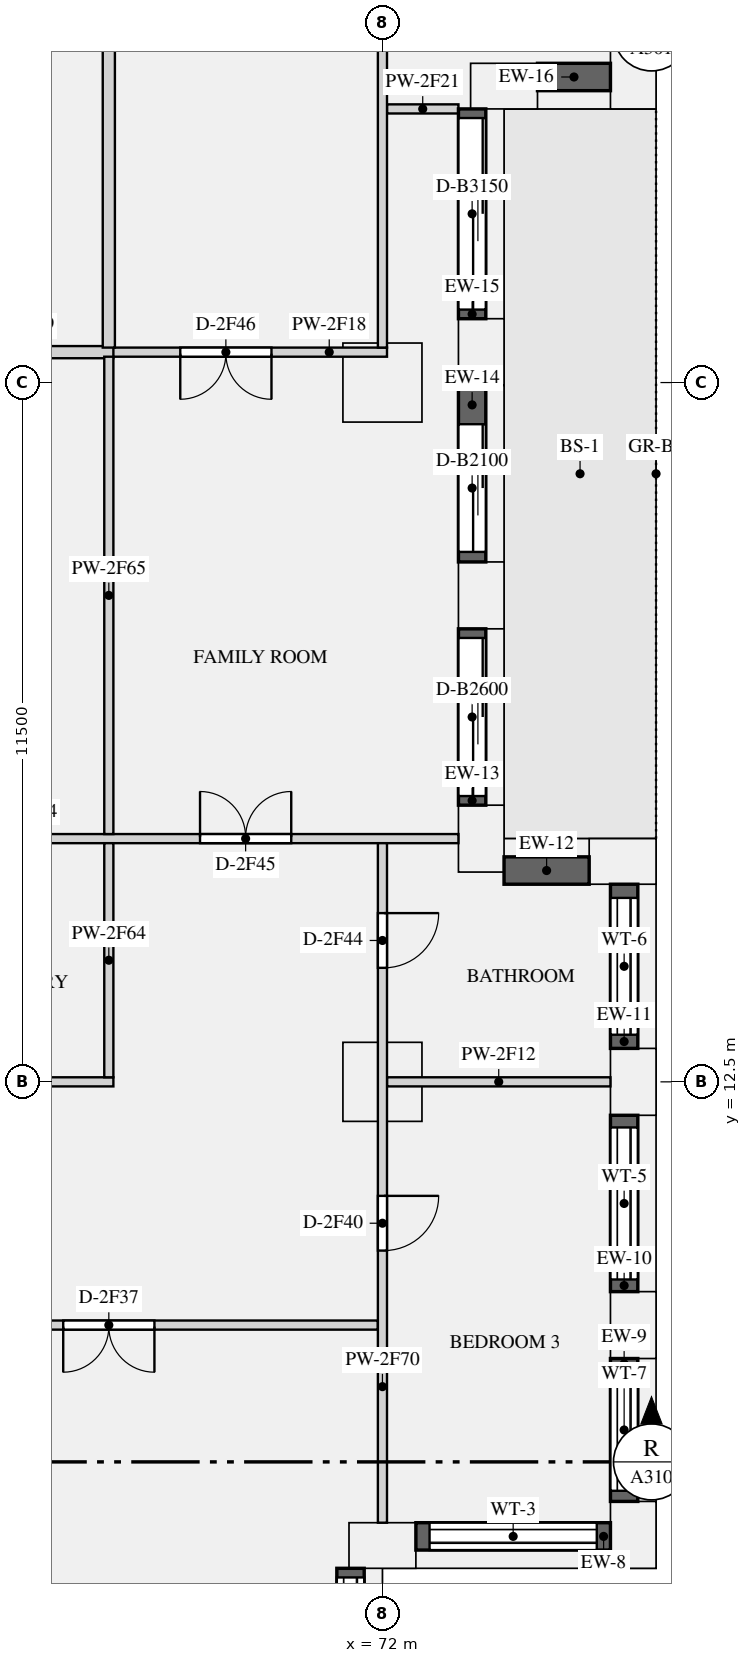
"""IFC4 building model, lengths in metres.
Left out: names, types, materials, properties, quantities, classifications, styles, units other than length and angle.
Written with IfcOpenShell. Run it as: python <this file> out.ifc"""

import sys

from ifc_helpers import new_model, si_unit, direction, frame, frame_2d, origin, origin_2d, place, context, subcontext, project, spatial, rectangle, extrude, element, fill, save


model = new_model("IFC4")
c1 = context("Model", 3, precision=1e-05, world=origin(), true_north=direction((0.0, 1.0)))
c2 = subcontext(c1, "Body", "Model", "MODEL_VIEW")
j1 = project(units=[si_unit("LENGTHUNIT", "METRE"), si_unit("PLANEANGLEUNIT", "RADIAN")], contexts=[c1])
p1 = place(None, origin())
s1 = spatial("IfcSite", under=j1, at=p1, CompositionType="ELEMENT")
p2 = place(p1, origin())
s2 = spatial("IfcBuilding", under=s1, at=p2, CompositionType="ELEMENT")
p3 = place(p2, frame((0.0, 0.0, 124.5)))
s3 = spatial("IfcBuildingStorey", under=s2, at=p3, CompositionType="ELEMENT", Elevation=124.5)
for number, where, z_axis, x_axis in (
    (1, (72.0, 4.875, 0.0), (0.0, 0.0, 1.0), (1.0, 0.0, 0.0)),
    (2, (76.125, 5.05, 0.0), (0.0, 0.0, 1.0), (0.0, 1.0, 0.0)),
    (3, (76.125, 8.5, 0.0), (0.0, 0.0, 1.0), (0.0, 1.0, 0.0)),
    (4, (76.125, 12.5, 0.0), (0.0, 0.0, 1.0), (0.0, 1.0, 0.0)),
    (5, (75.95, 16.125, 0.0), (0.0, 0.0, 1.0), (-1.0, 0.0, 0.0)),
    (6, (73.625, 16.5, 0.0), (0.0, 0.0, 1.0), (0.0, 1.0, 0.0)),
    (7, (73.625, 20.5, 0.0), (0.0, 0.0, 1.0), (0.0, 1.0, 0.0)),
    (8, (73.625, 24.5, 0.0), (0.0, 0.0, 1.0), (0.0, 1.0, 0.0)),
    (9, (74.0, 28.875, 0.0), (0.0, 0.0, 1.0), (1.0, 0.0, 0.0)),
    (10, (76.125, 29.05, 0.0), (0.0, 0.0, 1.0), (0.0, 1.0, 0.0)),
):
    element("IfcColumn", number, at=place(p3, frame(where, z_axis=z_axis, x_axis=x_axis)), inside=s3, PredefinedType="USERDEFINED", context=c2, shape_type="SweptSolid", body=[
        extrude(rectangle(XDim=1.1, YDim=0.75, at=origin_2d()), origin(), (0.0, 0.0, 1.0), 3.15),
    ])
for number, where, z_axis, x_axis in (
    (11, (72.0, 24.0, 0.0), (0.0, 0.0, 1.0), (1.0, 0.0, 0.0)),
    (12, (72.0, 12.5, 0.0), (0.0, 0.0, 1.0), (1.0, 0.0, 0.0)),
):
    element("IfcColumn", number, at=place(p3, frame(where, z_axis=z_axis, x_axis=x_axis)), inside=s3, PredefinedType="COLUMN", context=c2, shape_type="SweptSolid", body=[
        extrude(rectangle(XDim=1.3, YDim=1.3, at=origin_2d()), origin(), (0.0, 0.0, 1.0), 3.15),
    ])
p4 = place(p3, frame((71.475, 1.1, 0.9), z_axis=(0.0, 0.0, 1.0), x_axis=(0.0, 1.0, 0.0)))
e13 = element("IfcWall", 13, at=p4, inside=s3, PredefinedType="SOLIDWALL", context=c2, shape_type="SweptSolid", body=[
    extrude(rectangle(XDim=3.4, YDim=0.45, at=frame_2d((1.7, 0.0))), origin(), (0.0, 0.0, 1.0), 1.93),
])
p5 = place(p4, frame((0.15, 0.0, 0.15)))
e14 = element("IfcOpeningElement", 14, at=p5, cuts=e13, PredefinedType="OPENING", context=c2, shape_type="SweptSolid", body=[
    extrude(rectangle(XDim=3.1, YDim=1.5, at=frame_2d((1.55, 0.75))), frame((0.0, 0.235, 0.0), z_axis=(0.0, -1.0, 0.0), x_axis=(1.0, 0.0, 0.0)), (0.0, 0.0, 1.0), 0.47),
])
p6 = place(p3, frame((72.55, 5.025, 0.9), z_axis=(0.0, 0.0, 1.0), x_axis=(1.0, 0.0, 0.0)))
e15 = element("IfcWall", 15, at=p6, inside=s3, PredefinedType="SOLIDWALL", context=c2, shape_type="SweptSolid", body=[
    extrude(rectangle(XDim=3.2, YDim=0.45, at=frame_2d((1.6, 0.0))), origin(), (0.0, 0.0, 1.0), 1.93),
])
p7 = place(p6, frame((0.225, 0.0, 0.15)))
e16 = element("IfcOpeningElement", 16, at=p7, cuts=e15, PredefinedType="OPENING", context=c2, shape_type="SweptSolid", body=[
    extrude(rectangle(XDim=2.75, YDim=1.5, at=frame_2d((1.375, 0.75))), frame((0.0, 0.235, 0.0), z_axis=(0.0, -1.0, 0.0), x_axis=(1.0, 0.0, 0.0)), (0.0, 0.0, 1.0), 0.47),
])
p8 = place(p3, frame((75.975, 5.6, 0.9), z_axis=(0.0, 0.0, 1.0), x_axis=(0.0, 1.0, 0.0)))
e17 = element("IfcWall", 17, at=p8, inside=s3, PredefinedType="SOLIDWALL", context=c2, shape_type="SweptSolid", body=[
    extrude(rectangle(XDim=2.35, YDim=0.45, at=frame_2d((1.175, 0.0))), origin(), (0.0, 0.0, 1.0), 1.93),
])
p9 = place(p8, frame((0.175, 0.0, 0.15)))
e18 = element("IfcOpeningElement", 18, at=p9, cuts=e17, PredefinedType="OPENING", context=c2, shape_type="SweptSolid", body=[
    extrude(rectangle(XDim=2.0, YDim=1.5, at=frame_2d((1.0, 0.75))), frame((0.0, 0.235, 0.0), z_axis=(0.0, -1.0, 0.0), x_axis=(1.0, 0.0, 0.0)), (0.0, 0.0, 1.0), 0.47),
])
p10 = place(p3, frame((75.975, 9.05, 0.9), z_axis=(0.0, 0.0, 1.0), x_axis=(0.0, 1.0, 0.0)))
e19 = element("IfcWall", 19, at=p10, inside=s3, PredefinedType="SOLIDWALL", context=c2, shape_type="SweptSolid", body=[
    extrude(rectangle(XDim=2.9, YDim=0.45, at=frame_2d((1.45, 0.0))), origin(), (0.0, 0.0, 1.0), 1.93),
])
p11 = place(p10, frame((0.2, 0.0, 0.15)))
e20 = element("IfcOpeningElement", 20, at=p11, cuts=e19, PredefinedType="OPENING", context=c2, shape_type="SweptSolid", body=[
    extrude(rectangle(XDim=2.5, YDim=1.5, at=frame_2d((1.25, 0.75))), frame((0.0, 0.235, 0.0), z_axis=(0.0, -1.0, 0.0), x_axis=(1.0, 0.0, 0.0)), (0.0, 0.0, 1.0), 0.47),
])
p12 = place(p3, frame((75.975, 13.05, 0.9), z_axis=(0.0, 0.0, 1.0), x_axis=(0.0, 1.0, 0.0)))
e21 = element("IfcWall", 21, at=p12, inside=s3, PredefinedType="SOLIDWALL", context=c2, shape_type="SweptSolid", body=[
    extrude(rectangle(XDim=2.7, YDim=0.45, at=frame_2d((1.35, 0.0))), origin(), (0.0, 0.0, 1.0), 1.93),
])
p13 = place(p12, frame((0.225, 0.0, 0.15)))
e22 = element("IfcOpeningElement", 22, at=p13, cuts=e21, PredefinedType="OPENING", context=c2, shape_type="SweptSolid", body=[
    extrude(rectangle(XDim=2.25, YDim=1.5, at=frame_2d((1.125, 0.75))), frame((0.0, 0.235, 0.0), z_axis=(0.0, -1.0, 0.0), x_axis=(1.0, 0.0, 0.0)), (0.0, 0.0, 1.0), 0.47),
])
p14 = place(p3, frame((75.4, 15.975, 0.9), z_axis=(0.0, 0.0, 1.0), x_axis=(-1.0, 0.0, 0.0)))
e23 = element("IfcWall", 23, at=p14, inside=s3, PredefinedType="SOLIDWALL", context=c2, shape_type="SweptSolid", body=[
    extrude(rectangle(XDim=1.4, YDim=0.45, at=frame_2d((0.7, 0.0))), origin(), (0.0, 0.0, 1.0), 1.93),
])
p15 = place(p3, frame((73.475, 17.05, 0.0), z_axis=(0.0, 0.0, 1.0), x_axis=(0.0, 1.0, 0.0)))
e24 = element("IfcWall", 24, at=p15, inside=s3, PredefinedType="SOLIDWALL", context=c2, shape_type="SweptSolid", body=[
    extrude(rectangle(XDim=2.9, YDim=0.45, at=frame_2d((1.45, 0.0))), origin(), (0.0, 0.0, 1.0), 2.83),
])
p16 = place(p15, frame((0.15, 0.0, 0.0)))
e25 = element("IfcOpeningElement", 25, at=p16, cuts=e24, PredefinedType="OPENING", context=c2, shape_type="SweptSolid", body=[
    extrude(rectangle(XDim=2.6, YDim=2.3, at=frame_2d((1.3, 1.15))), frame((0.0, 0.235, 0.0), z_axis=(0.0, -1.0, 0.0), x_axis=(1.0, 0.0, 0.0)), (0.0, 0.0, 1.0), 0.47),
])
p17 = place(p3, frame((73.475, 21.05, 0.0), z_axis=(0.0, 0.0, 1.0), x_axis=(0.0, 1.0, 0.0)))
e26 = element("IfcWall", 26, at=p17, inside=s3, PredefinedType="SOLIDWALL", context=c2, shape_type="SweptSolid", body=[
    extrude(rectangle(XDim=2.9, YDim=0.45, at=frame_2d((1.45, 0.0))), origin(), (0.0, 0.0, 1.0), 2.83),
])
p18 = place(p17, frame((0.165, 0.0, 0.0)))
e27 = element("IfcOpeningElement", 27, at=p18, cuts=e26, PredefinedType="OPENING", context=c2, shape_type="SweptSolid", body=[
    extrude(rectangle(XDim=2.1, YDim=2.3, at=frame_2d((1.05, 1.15))), frame((0.0, 0.235, 0.0), z_axis=(0.0, -1.0, 0.0), x_axis=(1.0, 0.0, 0.0)), (0.0, 0.0, 1.0), 0.47),
])
p19 = place(p3, frame((73.475, 25.05, 0.0), z_axis=(0.0, 0.0, 1.0), x_axis=(0.0, 1.0, 0.0)))
e28 = element("IfcWall", 28, at=p19, inside=s3, PredefinedType="SOLIDWALL", context=c2, shape_type="SweptSolid", body=[
    extrude(rectangle(XDim=3.45, YDim=0.45, at=frame_2d((1.725, 0.0))), origin(), (0.0, 0.0, 1.0), 2.83),
])
p20 = place(p19, frame((0.15, 0.0, 0.0)))
e29 = element("IfcOpeningElement", 29, at=p20, cuts=e28, PredefinedType="OPENING", context=c2, shape_type="SweptSolid", body=[
    extrude(rectangle(XDim=3.15, YDim=2.3, at=frame_2d((1.575, 1.15))), frame((0.0, 0.235, 0.0), z_axis=(0.0, -1.0, 0.0), x_axis=(1.0, 0.0, 0.0)), (0.0, 0.0, 1.0), 0.47),
])
p21 = place(p3, frame((74.55, 29.025, 0.9), z_axis=(0.0, 0.0, 1.0), x_axis=(1.0, 0.0, 0.0)))
e30 = element("IfcWall", 30, at=p21, inside=s3, PredefinedType="SOLIDWALL", context=c2, shape_type="SweptSolid", body=[
    extrude(rectangle(XDim=1.2, YDim=0.45, at=frame_2d((0.6, 0.0))), origin(), (0.0, 0.0, 1.0), 1.93),
])
p22 = place(p3, frame((58.425, 12.5, 0.0), z_axis=(0.0, 0.0, 1.0), x_axis=(1.0, 0.0, 0.0)))
e31 = element("IfcWall", 31, at=p22, inside=s3, PredefinedType="PARTITIONING", context=c2, shape_type="SweptSolid", body=[
    extrude(rectangle(XDim=9.15, YDim=0.15, at=frame_2d((4.575, 0.0))), origin(), (0.0, 0.0, 1.0), 2.83),
])
p23 = place(p3, frame((72.075, 12.5, 0.0), z_axis=(0.0, 0.0, 1.0), x_axis=(1.0, 0.0, 0.0)))
e32 = element("IfcWall", 32, at=p23, inside=s3, PredefinedType="PARTITIONING", context=c2, shape_type="SweptSolid", body=[
    extrude(rectangle(XDim=3.675, YDim=0.15, at=frame_2d((1.837, 0.0))), origin(), (0.0, 0.0, 1.0), 2.83),
])
p24 = place(p3, frame((63.075, 16.5, 0.0), z_axis=(0.0, 0.0, 1.0), x_axis=(1.0, 0.0, 0.0)))
e33 = element("IfcWall", 33, at=p24, inside=s3, PredefinedType="PARTITIONING", context=c2, shape_type="SweptSolid", body=[
    extrude(rectangle(XDim=10.175, YDim=0.15, at=frame_2d((5.087, 0.0))), origin(), (0.0, 0.0, 1.0), 2.83),
])
p25 = place(p24, frame((5.925, 0.0, 0.0)))
e34 = element("IfcOpeningElement", 34, at=p25, cuts=e33, PredefinedType="OPENING", context=c2, shape_type="SweptSolid", body=[
    extrude(rectangle(XDim=1.5, YDim=2.1, at=frame_2d((0.75, 1.05))), frame((0.0, 0.085, 0.0), z_axis=(0.0, -1.0, 0.0), x_axis=(1.0, 0.0, 0.0)), (0.0, 0.0, 1.0), 0.17),
])
p26 = place(p3, frame((54.0, 8.5, 0.0), z_axis=(0.0, 0.0, 1.0), x_axis=(1.0, 0.0, 0.0)))
e35 = element("IfcWall", 35, at=p26, inside=s3, PredefinedType="PARTITIONING", context=c2, shape_type="SweptSolid", body=[
    extrude(rectangle(XDim=17.925, YDim=0.15, at=frame_2d((8.962, 0.0))), origin(), (0.0, 0.0, 1.0), 2.83),
])
p27 = place(p26, frame((1.8, 0.0, 0.0)))
e36 = element("IfcOpeningElement", 36, at=p27, cuts=e35, PredefinedType="OPENING", context=c2, shape_type="SweptSolid", body=[
    extrude(rectangle(XDim=0.9, YDim=2.1, at=frame_2d((0.45, 1.05))), frame((0.0, 0.085, 0.0), z_axis=(0.0, -1.0, 0.0), x_axis=(1.0, 0.0, 0.0)), (0.0, 0.0, 1.0), 0.17),
])
p28 = place(p26, frame((12.75, 0.0, 0.0)))
e37 = element("IfcOpeningElement", 37, at=p28, cuts=e35, PredefinedType="OPENING", context=c2, shape_type="SweptSolid", body=[
    extrude(rectangle(XDim=1.5, YDim=2.1, at=frame_2d((0.75, 1.05))), frame((0.0, 0.085, 0.0), z_axis=(0.0, -1.0, 0.0), x_axis=(1.0, 0.0, 0.0)), (0.0, 0.0, 1.0), 0.17),
])
p29 = place(p26, frame((6.3, 0.0, 0.0)))
e38 = element("IfcOpeningElement", 38, at=p29, cuts=e35, PredefinedType="OPENING", context=c2, shape_type="SweptSolid", body=[
    extrude(rectangle(XDim=0.9, YDim=2.1, at=frame_2d((0.45, 1.05))), frame((0.0, 0.085, 0.0), z_axis=(0.0, -1.0, 0.0), x_axis=(1.0, 0.0, 0.0)), (0.0, 0.0, 1.0), 0.17),
])
p30 = place(p3, frame((67.425, 24.5, 0.0), z_axis=(0.0, 0.0, 1.0), x_axis=(1.0, 0.0, 0.0)))
e39 = element("IfcWall", 39, at=p30, inside=s3, PredefinedType="PARTITIONING", context=c2, shape_type="SweptSolid", body=[
    extrude(rectangle(XDim=4.65, YDim=0.15, at=frame_2d((2.325, 0.0))), origin(), (0.0, 0.0, 1.0), 2.83),
])
p31 = place(p30, frame((1.25, 0.0, 0.0)))
e40 = element("IfcOpeningElement", 40, at=p31, cuts=e39, PredefinedType="OPENING", context=c2, shape_type="SweptSolid", body=[
    extrude(rectangle(XDim=1.5, YDim=2.1, at=frame_2d((0.75, 1.05))), frame((0.0, 0.085, 0.0), z_axis=(0.0, -1.0, 0.0), x_axis=(1.0, 0.0, 0.0)), (0.0, 0.0, 1.0), 0.17),
])
p32 = place(p3, frame((64.4, 24.5, 0.0), z_axis=(0.0, 0.0, 1.0), x_axis=(1.0, 0.0, 0.0)))
e41 = element("IfcWall", 41, at=p32, inside=s3, PredefinedType="PARTITIONING", context=c2, shape_type="SweptSolid", body=[
    extrude(rectangle(XDim=3.175, YDim=0.2, at=frame_2d((1.587, 0.0))), origin(), (0.0, 0.0, 1.0), 2.83),
])
p33 = place(p3, frame((72.075, 28.5, 0.0), z_axis=(0.0, 0.0, 1.0), x_axis=(1.0, 0.0, 0.0)))
e42 = element("IfcWall", 42, at=p33, inside=s3, PredefinedType="PARTITIONING", context=c2, shape_type="SweptSolid", body=[
    extrude(rectangle(XDim=1.175, YDim=0.15, at=frame_2d((0.587, 0.0))), origin(), (0.0, 0.0, 1.0), 2.83),
])
p34 = place(p3, frame((67.5, 12.575, 0.0), z_axis=(0.0, 0.0, 1.0), x_axis=(0.0, 1.0, 0.0)))
e43 = element("IfcWall", 43, at=p34, inside=s3, PredefinedType="PARTITIONING", context=c2, shape_type="SweptSolid", body=[
    extrude(rectangle(XDim=3.85, YDim=0.15, at=frame_2d((1.925, 0.0))), origin(), (0.0, 0.0, 1.0), 2.83),
])
p35 = place(p3, frame((67.5, 16.575, 0.0), z_axis=(0.0, 0.0, 1.0), x_axis=(0.0, 1.0, 0.0)))
e44 = element("IfcWall", 44, at=p35, inside=s3, PredefinedType="PARTITIONING", context=c2, shape_type="SweptSolid", body=[
    extrude(rectangle(XDim=7.85, YDim=0.15, at=frame_2d((3.925, 0.0))), origin(), (0.0, 0.0, 1.0), 2.83),
])
p36 = place(p3, frame((67.5, 24.575, 0.0), z_axis=(0.0, 0.0, 1.0), x_axis=(0.0, 1.0, 0.0)))
e45 = element("IfcWall", 45, at=p36, inside=s3, PredefinedType="PARTITIONING", context=c2, shape_type="SweptSolid", body=[
    extrude(rectangle(XDim=20.175, YDim=0.2, at=frame_2d((10.087, 0.0))), origin(), (0.0, 0.0, 1.0), 2.83),
])
p37 = place(p3, frame((72.0, 5.25, 0.0), z_axis=(0.0, 0.0, 1.0), x_axis=(0.0, 1.0, 0.0)))
e46 = element("IfcWall", 46, at=p37, inside=s3, PredefinedType="PARTITIONING", context=c2, shape_type="SweptSolid", body=[
    extrude(rectangle(XDim=11.175, YDim=0.15, at=frame_2d((5.587, 0.0))), origin(), (0.0, 0.0, 1.0), 2.83),
])
p38 = place(p37, frame((4.475, 0.0, 0.0)))
e47 = element("IfcOpeningElement", 47, at=p38, cuts=e46, PredefinedType="OPENING", context=c2, shape_type="SweptSolid", body=[
    extrude(rectangle(XDim=0.9, YDim=2.1, at=frame_2d((0.45, 1.05))), frame((0.0, 0.085, 0.0), z_axis=(0.0, -1.0, 0.0), x_axis=(1.0, 0.0, 0.0)), (0.0, 0.0, 1.0), 0.17),
])
p39 = place(p37, frame((9.125, 0.0, 0.0)))
e48 = element("IfcOpeningElement", 48, at=p39, cuts=e46, PredefinedType="OPENING", context=c2, shape_type="SweptSolid", body=[
    extrude(rectangle(XDim=0.9, YDim=2.1, at=frame_2d((0.45, 1.05))), frame((0.0, 0.085, 0.0), z_axis=(0.0, -1.0, 0.0), x_axis=(1.0, 0.0, 0.0)), (0.0, 0.0, 1.0), 0.17),
])
p40 = place(p3, frame((72.0, 24.575, 0.0), z_axis=(0.0, 0.0, 1.0), x_axis=(0.0, 1.0, 0.0)))
e49 = element("IfcWall", 49, at=p40, inside=s3, PredefinedType="PARTITIONING", context=c2, shape_type="SweptSolid", body=[
    extrude(rectangle(XDim=15.675, YDim=0.15, at=frame_2d((7.837, 0.0))), origin(), (0.0, 0.0, 1.0), 2.83),
])
p41 = place(p40, frame((6.65, 0.0, 0.0)))
e50 = element("IfcOpeningElement", 50, at=p41, cuts=e49, PredefinedType="OPENING", context=c2, shape_type="SweptSolid", body=[
    extrude(rectangle(XDim=0.9, YDim=2.1, at=frame_2d((0.45, 1.05))), frame((0.0, 0.085, 0.0), z_axis=(0.0, -1.0, 0.0), x_axis=(1.0, 0.0, 0.0)), (0.0, 0.0, 1.0), 0.17),
])
p42 = place(p5, origin())
e51 = element("IfcWindow", 51, at=p42, inside=s3, PartitioningType="SINGLE_PANEL", PredefinedType="WINDOW", context=c2, shape_type="SweptSolid", body=[
    extrude(rectangle(XDim=3.1, YDim=1.5, at=frame_2d((1.55, 0.75))), frame((0.0, -0.065, 0.0), z_axis=(0.0, -1.0, 0.0), x_axis=(1.0, 0.0, 0.0)), (0.0, 0.0, 1.0), 0.06),
])
fill(e14, e51)
p43 = place(p7, origin())
e52 = element("IfcWindow", 52, at=p43, inside=s3, PartitioningType="SINGLE_PANEL", PredefinedType="WINDOW", context=c2, shape_type="SweptSolid", body=[
    extrude(rectangle(XDim=2.75, YDim=1.5, at=frame_2d((1.375, 0.75))), frame((0.0, -0.065, 0.0), z_axis=(0.0, -1.0, 0.0), x_axis=(1.0, 0.0, 0.0)), (0.0, 0.0, 1.0), 0.06),
])
fill(e16, e52)
p44 = place(p9, origin())
e53 = element("IfcWindow", 53, at=p44, inside=s3, PartitioningType="SINGLE_PANEL", PredefinedType="WINDOW", context=c2, shape_type="SweptSolid", body=[
    extrude(rectangle(XDim=2.0, YDim=1.5, at=frame_2d((1.0, 0.75))), frame((0.0, -0.065, 0.0), z_axis=(0.0, -1.0, 0.0), x_axis=(1.0, 0.0, 0.0)), (0.0, 0.0, 1.0), 0.06),
])
fill(e18, e53)
p45 = place(p11, origin())
e54 = element("IfcWindow", 54, at=p45, inside=s3, PartitioningType="SINGLE_PANEL", PredefinedType="WINDOW", context=c2, shape_type="SweptSolid", body=[
    extrude(rectangle(XDim=2.5, YDim=1.5, at=frame_2d((1.25, 0.75))), frame((0.0, -0.065, 0.0), z_axis=(0.0, -1.0, 0.0), x_axis=(1.0, 0.0, 0.0)), (0.0, 0.0, 1.0), 0.06),
])
fill(e20, e54)
p46 = place(p13, origin())
e55 = element("IfcWindow", 55, at=p46, inside=s3, PartitioningType="SINGLE_PANEL", PredefinedType="WINDOW", context=c2, shape_type="SweptSolid", body=[
    extrude(rectangle(XDim=2.25, YDim=1.5, at=frame_2d((1.125, 0.75))), frame((0.0, -0.065, 0.0), z_axis=(0.0, -1.0, 0.0), x_axis=(1.0, 0.0, 0.0)), (0.0, 0.0, 1.0), 0.06),
])
fill(e22, e55)
p47 = place(p16, origin())
e56 = element("IfcDoor", 56, at=p47, inside=s3, OperationType="SLIDING_TO_LEFT", PredefinedType="DOOR", context=c2, shape_type="SweptSolid", body=[
    extrude(rectangle(XDim=2.6, YDim=2.3, at=frame_2d((1.3, 1.15))), frame((0.0, -0.07, 0.0), z_axis=(0.0, -1.0, 0.0), x_axis=(1.0, 0.0, 0.0)), (0.0, 0.0, 1.0), 0.05),
])
fill(e25, e56)
p48 = place(p18, origin())
e57 = element("IfcDoor", 57, at=p48, inside=s3, OperationType="SLIDING_TO_LEFT", PredefinedType="DOOR", context=c2, shape_type="SweptSolid", body=[
    extrude(rectangle(XDim=2.1, YDim=2.3, at=frame_2d((1.05, 1.15))), frame((0.0, -0.07, 0.0), z_axis=(0.0, -1.0, 0.0), x_axis=(1.0, 0.0, 0.0)), (0.0, 0.0, 1.0), 0.05),
])
fill(e27, e57)
p49 = place(p20, origin())
e58 = element("IfcDoor", 58, at=p49, inside=s3, OperationType="SLIDING_TO_LEFT", PredefinedType="DOOR", context=c2, shape_type="SweptSolid", body=[
    extrude(rectangle(XDim=3.15, YDim=2.3, at=frame_2d((1.575, 1.15))), frame((0.0, -0.07, 0.0), z_axis=(0.0, -1.0, 0.0), x_axis=(1.0, 0.0, 0.0)), (0.0, 0.0, 1.0), 0.05),
])
fill(e29, e58)
p50 = place(p28, frame((1.5, 0.0, 0.0), z_axis=(0.0, 0.0, 1.0), x_axis=(-1.0, 0.0, 0.0)))
e59 = element("IfcDoor", 59, at=p50, inside=s3, OperationType="DOUBLE_DOOR_SINGLE_SWING", PredefinedType="DOOR", context=c2, shape_type="SweptSolid", body=[
    extrude(rectangle(XDim=1.5, YDim=2.1, at=frame_2d((0.75, 1.05))), frame((0.0, 0.025, 0.0), z_axis=(0.0, -1.0, 0.0), x_axis=(1.0, 0.0, 0.0)), (0.0, 0.0, 1.0), 0.05),
])
fill(e37, e59)
p51 = place(p38, frame((0.9, 0.0, 0.0), z_axis=(0.0, 0.0, 1.0), x_axis=(-1.0, 0.0, 0.0)))
e60 = element("IfcDoor", 60, at=p51, inside=s3, OperationType="SINGLE_SWING_LEFT", PredefinedType="DOOR", context=c2, shape_type="SweptSolid", body=[
    extrude(rectangle(XDim=0.9, YDim=2.1, at=frame_2d((0.45, 1.05))), frame((0.0, 0.025, 0.0), z_axis=(0.0, -1.0, 0.0), x_axis=(1.0, 0.0, 0.0)), (0.0, 0.0, 1.0), 0.05),
])
fill(e47, e60)
p52 = place(p39, frame((0.9, 0.0, 0.0), z_axis=(0.0, 0.0, 1.0), x_axis=(-1.0, 0.0, 0.0)))
e61 = element("IfcDoor", 61, at=p52, inside=s3, OperationType="SINGLE_SWING_LEFT", PredefinedType="DOOR", context=c2, shape_type="SweptSolid", body=[
    extrude(rectangle(XDim=0.9, YDim=2.1, at=frame_2d((0.45, 1.05))), frame((0.0, 0.025, 0.0), z_axis=(0.0, -1.0, 0.0), x_axis=(1.0, 0.0, 0.0)), (0.0, 0.0, 1.0), 0.05),
])
fill(e48, e61)
p53 = place(p25, origin())
e62 = element("IfcDoor", 62, at=p53, inside=s3, OperationType="DOUBLE_DOOR_SINGLE_SWING", PredefinedType="DOOR", context=c2, shape_type="SweptSolid", body=[
    extrude(rectangle(XDim=1.5, YDim=2.1, at=frame_2d((0.75, 1.05))), frame((0.0, 0.025, 0.0), z_axis=(0.0, -1.0, 0.0), x_axis=(1.0, 0.0, 0.0)), (0.0, 0.0, 1.0), 0.05),
])
fill(e34, e62)
p54 = place(p31, frame((1.5, 0.0, 0.0), z_axis=(0.0, 0.0, 1.0), x_axis=(-1.0, 0.0, 0.0)))
e63 = element("IfcDoor", 63, at=p54, inside=s3, OperationType="DOUBLE_DOOR_SINGLE_SWING", PredefinedType="DOOR", context=c2, shape_type="SweptSolid", body=[
    extrude(rectangle(XDim=1.5, YDim=2.1, at=frame_2d((0.75, 1.05))), frame((0.0, 0.025, 0.0), z_axis=(0.0, -1.0, 0.0), x_axis=(1.0, 0.0, 0.0)), (0.0, 0.0, 1.0), 0.05),
])
fill(e40, e63)
save(model, sys.argv[1])
